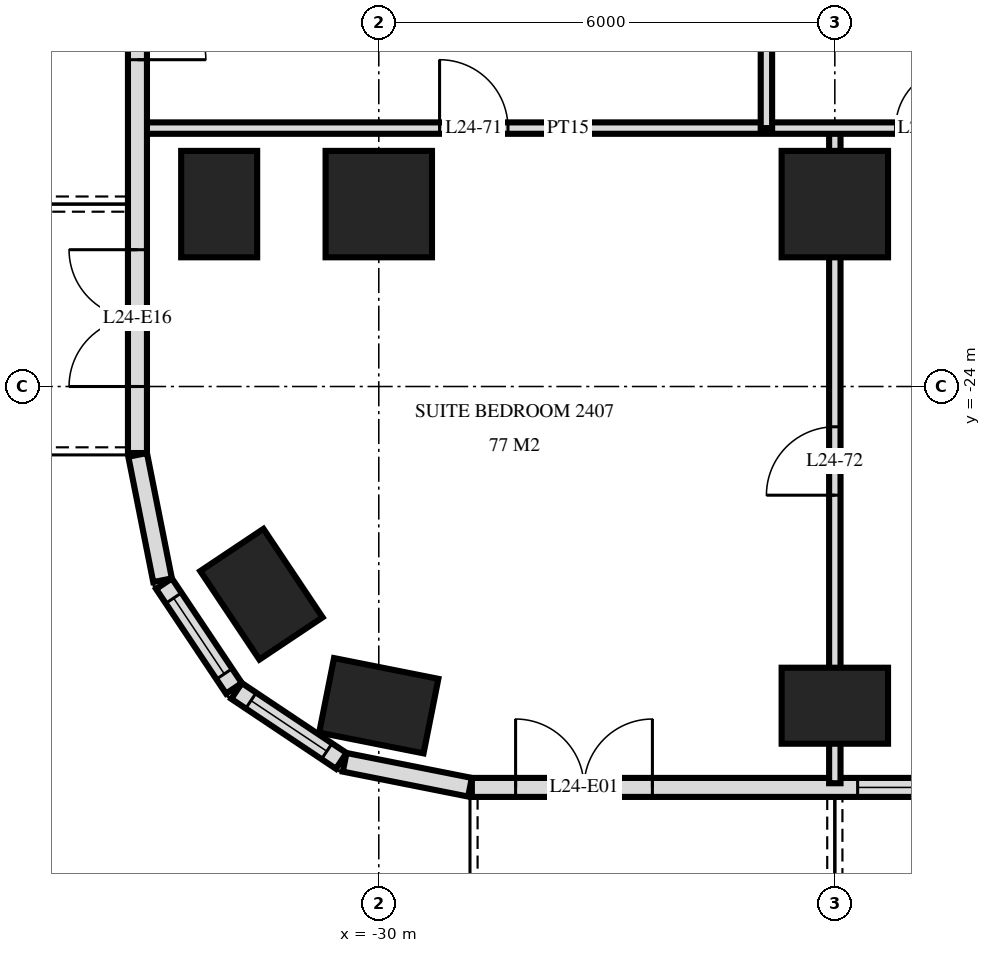
"""IFC4 building model, lengths in metres.
Left out: names, types, materials, properties, quantities, classifications, styles, units other than length and angle.
Written with IfcOpenShell. Run it as: python <this file> out.ifc"""

import sys

from ifc_helpers import new_model, si_unit, direction, frame, frame_2d, origin, origin_2d, place, context, subcontext, project, spatial, rectangle, extrude, element, fill, save


model = new_model("IFC4")
c1 = context("Model", 3, precision=1e-05, world=origin(), true_north=direction((0.0, 1.0)))
c2 = subcontext(c1, "Body", "Model", "MODEL_VIEW")
j1 = project(units=[si_unit("LENGTHUNIT", "METRE"), si_unit("PLANEANGLEUNIT", "RADIAN")], contexts=[c1])
p1 = place(None, origin())
s1 = spatial("IfcSite", under=j1, at=p1, CompositionType="ELEMENT")
p2 = place(p1, origin())
s2 = spatial("IfcBuilding", under=s1, at=p2, CompositionType="ELEMENT")
p3 = place(p2, frame((0.0, 0.0, 96.0)))
s3 = spatial("IfcBuildingStorey", under=s2, at=p3, CompositionType="ELEMENT", Elevation=96.0)
for number, where, z_axis, x_axis in (
    (1, (-32.1, -21.6, 0.0), (0.0, 0.0, 1.0), (0.0, 1.0, 0.0)),
    (2, (-31.544, -26.733, 0.0), (0.0, 0.0, 1.0), (-0.556, 0.831, 0.0)),
    (3, (-30.0, -28.2, 0.0), (0.0, 0.0, 1.0), (-0.981, 0.195, 0.0)),
):
    element("IfcColumn", number, at=place(p3, frame(where, z_axis=z_axis, x_axis=x_axis)), inside=s3, PredefinedType="COLUMN", context=c2, shape_type="SweptSolid", body=[
        extrude(rectangle(XDim=1.4, YDim=1.0, at=origin_2d()), origin(), (0.0, 0.0, 1.0), 3.6),
    ])
p4 = place(p3, frame((-30.0, -21.6, 0.0), z_axis=(0.0, 0.0, 1.0), x_axis=(1.0, 0.0, 0.0)))
e4 = element("IfcColumn", 4, at=p4, inside=s3, PredefinedType="COLUMN", context=c2, shape_type="SweptSolid", body=[
    extrude(rectangle(XDim=1.4, YDim=1.4, at=origin_2d()), origin(), (0.0, 0.0, 1.0), 3.6),
])
p5 = place(p3, frame((-24.0, -28.2, 0.0), z_axis=(0.0, 0.0, 1.0), x_axis=(1.0, 0.0, 0.0)))
e5 = element("IfcColumn", 5, at=p5, inside=s3, PredefinedType="COLUMN", context=c2, shape_type="SweptSolid", body=[
    extrude(rectangle(XDim=1.4, YDim=1.0, at=origin_2d()), origin(), (0.0, 0.0, 1.0), 3.6),
])
p6 = place(p3, frame((-24.0, -21.6, 0.0), z_axis=(0.0, 0.0, 1.0), x_axis=(1.0, 0.0, 0.0)))
e6 = element("IfcColumn", 6, at=p6, inside=s3, PredefinedType="COLUMN", context=c2, shape_type="SweptSolid", body=[
    extrude(rectangle(XDim=1.4, YDim=1.4, at=origin_2d()), origin(), (0.0, 0.0, 1.0), 3.6),
])
p7 = place(p3, frame((-33.175, -3.325, 0.0), z_axis=(0.0, 0.0, 1.0), x_axis=(0.0, -1.0, 0.0)))
e7 = element("IfcWall", 7, at=p7, inside=s3, PredefinedType="SOLIDWALL", context=c2, shape_type="SweptSolid", body=[
    extrude(rectangle(XDim=21.551, YDim=0.25, at=frame_2d((10.775, 0.0))), origin(), (0.0, 0.0, 1.0), 3.32),
])
p8 = place(p7, frame((7.025, 0.0, 0.0)))
e8 = element("IfcOpeningElement", 8, at=p8, cuts=e7, PredefinedType="OPENING", context=c2, shape_type="SweptSolid", body=[
    extrude(rectangle(XDim=1.8, YDim=2.4, at=frame_2d((0.9, 1.2))), frame((0.0, 0.135, 0.0), z_axis=(0.0, -1.0, 0.0), x_axis=(1.0, 0.0, 0.0)), (0.0, 0.0, 1.0), 0.27),
])
p9 = place(p7, frame((12.075, 0.0, 0.3)))
e9 = element("IfcOpeningElement", 9, at=p9, cuts=e7, PredefinedType="OPENING", context=c2, shape_type="SweptSolid", body=[
    extrude(rectangle(XDim=1.2, YDim=2.1, at=frame_2d((0.6, 1.05))), frame((0.0, 0.135, 0.0), z_axis=(0.0, -1.0, 0.0), x_axis=(1.0, 0.0, 0.0)), (0.0, 0.0, 1.0), 0.27),
])
p10 = place(p7, frame((14.575, 0.0, 0.0)))
e10 = element("IfcOpeningElement", 10, at=p10, cuts=e7, PredefinedType="OPENING", context=c2, shape_type="SweptSolid", body=[
    extrude(rectangle(XDim=1.8, YDim=2.4, at=frame_2d((0.9, 1.2))), frame((0.0, 0.135, 0.0), z_axis=(0.0, -1.0, 0.0), x_axis=(1.0, 0.0, 0.0)), (0.0, 0.0, 1.0), 0.27),
])
p11 = place(p7, frame((18.875, 0.0, 0.0)))
e11 = element("IfcOpeningElement", 11, at=p11, cuts=e7, PredefinedType="OPENING", context=c2, shape_type="SweptSolid", body=[
    extrude(rectangle(XDim=1.8, YDim=2.4, at=frame_2d((0.9, 1.2))), frame((0.0, 0.135, 0.0), z_axis=(0.0, -1.0, 0.0), x_axis=(1.0, 0.0, 0.0)), (0.0, 0.0, 1.0), 0.27),
])
p12 = place(p3, frame((-33.173, -24.9, 0.0), z_axis=(0.0, 0.0, 1.0), x_axis=(0.195166572128, -0.980770110232, 0.0)))
e12 = element("IfcWall", 12, at=p12, inside=s3, PredefinedType="SOLIDWALL", context=c2, shape_type="SweptSolid", body=[
    extrude(rectangle(XDim=1.681, YDim=0.25, at=frame_2d((0.841, 0.0))), origin(), (0.0, 0.0, 1.0), 3.32),
])
p13 = place(p3, frame((-32.826, -26.594, 0.0), z_axis=(0.0, 0.0, 1.0), x_axis=(0.55555029066, -0.831482937015, 0.0)))
e13 = element("IfcWall", 13, at=p13, inside=s3, PredefinedType="SOLIDWALL", context=c2, shape_type="SweptSolid", body=[
    extrude(rectangle(XDim=1.656, YDim=0.25, at=frame_2d((0.828, 0.0))), origin(), (0.0, 0.0, 1.0), 3.32),
])
p14 = place(p13, frame((0.228, 0.0, 0.9)))
e14 = element("IfcOpeningElement", 14, at=p14, cuts=e13, PredefinedType="OPENING", context=c2, shape_type="SweptSolid", body=[
    extrude(rectangle(XDim=1.2, YDim=1.5, at=frame_2d((0.6, 0.75))), frame((0.0, 0.135, 0.0), z_axis=(0.0, -1.0, 0.0), x_axis=(1.0, 0.0, 0.0)), (0.0, 0.0, 1.0), 0.27),
])
p15 = place(p3, frame((-31.871, -28.006, 0.0), z_axis=(0.0, 0.0, 1.0), x_axis=(0.831482937015, -0.55555029066, 0.0)))
e15 = element("IfcWall", 15, at=p15, inside=s3, PredefinedType="SOLIDWALL", context=c2, shape_type="SweptSolid", body=[
    extrude(rectangle(XDim=1.656, YDim=0.25, at=frame_2d((0.828, 0.0))), origin(), (0.0, 0.0, 1.0), 3.32),
])
p16 = place(p15, frame((0.228, 0.0, 0.9)))
e16 = element("IfcOpeningElement", 16, at=p16, cuts=e15, PredefinedType="OPENING", context=c2, shape_type="SweptSolid", body=[
    extrude(rectangle(XDim=1.2, YDim=1.5, at=frame_2d((0.6, 0.75))), frame((0.0, 0.135, 0.0), z_axis=(0.0, -1.0, 0.0), x_axis=(1.0, 0.0, 0.0)), (0.0, 0.0, 1.0), 0.27),
])
p17 = place(p3, frame((-30.449, -28.945, 0.0), z_axis=(0.0, 0.0, 1.0), x_axis=(0.980775640221, -0.19513878023, 0.0)))
e17 = element("IfcWall", 17, at=p17, inside=s3, PredefinedType="SOLIDWALL", context=c2, shape_type="SweptSolid", body=[
    extrude(rectangle(XDim=1.681, YDim=0.25, at=frame_2d((0.841, 0.0))), origin(), (0.0, 0.0, 1.0), 3.32),
])
p18 = place(p3, frame((-28.775, -29.275, 0.0), z_axis=(0.0, 0.0, 1.0), x_axis=(1.0, 0.0, 0.0)))
e18 = element("IfcWall", 18, at=p18, inside=s3, PredefinedType="SOLIDWALL", context=c2, shape_type="SweptSolid", body=[
    extrude(rectangle(XDim=57.551, YDim=0.25, at=frame_2d((28.775, 0.0))), origin(), (0.0, 0.0, 1.0), 3.32),
])
p19 = place(p18, frame((0.575, 0.0, 0.0)))
e19 = element("IfcOpeningElement", 19, at=p19, cuts=e18, PredefinedType="OPENING", context=c2, shape_type="SweptSolid", body=[
    extrude(rectangle(XDim=1.8, YDim=2.4, at=frame_2d((0.9, 1.2))), frame((0.0, 0.135, 0.0), z_axis=(0.0, -1.0, 0.0), x_axis=(1.0, 0.0, 0.0)), (0.0, 0.0, 1.0), 0.27),
])
p20 = place(p18, frame((5.075, 0.0, 0.3)))
e20 = element("IfcOpeningElement", 20, at=p20, cuts=e18, PredefinedType="OPENING", context=c2, shape_type="SweptSolid", body=[
    extrude(rectangle(XDim=2.4, YDim=2.1, at=frame_2d((1.2, 1.05))), frame((0.0, 0.135, 0.0), z_axis=(0.0, -1.0, 0.0), x_axis=(1.0, 0.0, 0.0)), (0.0, 0.0, 1.0), 0.27),
])
p21 = place(p18, frame((8.375, 0.0, 0.0)))
e21 = element("IfcOpeningElement", 21, at=p21, cuts=e18, PredefinedType="OPENING", context=c2, shape_type="SweptSolid", body=[
    extrude(rectangle(XDim=1.8, YDim=2.4, at=frame_2d((0.9, 1.2))), frame((0.0, 0.135, 0.0), z_axis=(0.0, -1.0, 0.0), x_axis=(1.0, 0.0, 0.0)), (0.0, 0.0, 1.0), 0.27),
])
p22 = place(p18, frame((11.375, 0.0, 0.0)))
e22 = element("IfcOpeningElement", 22, at=p22, cuts=e18, PredefinedType="OPENING", context=c2, shape_type="SweptSolid", body=[
    extrude(rectangle(XDim=1.8, YDim=2.4, at=frame_2d((0.9, 1.2))), frame((0.0, 0.135, 0.0), z_axis=(0.0, -1.0, 0.0), x_axis=(1.0, 0.0, 0.0)), (0.0, 0.0, 1.0), 0.27),
])
p23 = place(p18, frame((14.075, 0.0, 0.3)))
e23 = element("IfcOpeningElement", 23, at=p23, cuts=e18, PredefinedType="OPENING", context=c2, shape_type="SweptSolid", body=[
    extrude(rectangle(XDim=2.4, YDim=2.1, at=frame_2d((1.2, 1.05))), frame((0.0, 0.135, 0.0), z_axis=(0.0, -1.0, 0.0), x_axis=(1.0, 0.0, 0.0)), (0.0, 0.0, 1.0), 0.27),
])
p24 = place(p18, frame((17.375, 0.0, 0.0)))
e24 = element("IfcOpeningElement", 24, at=p24, cuts=e18, PredefinedType="OPENING", context=c2, shape_type="SweptSolid", body=[
    extrude(rectangle(XDim=1.8, YDim=2.4, at=frame_2d((0.9, 1.2))), frame((0.0, 0.135, 0.0), z_axis=(0.0, -1.0, 0.0), x_axis=(1.0, 0.0, 0.0)), (0.0, 0.0, 1.0), 0.27),
])
p25 = place(p18, frame((20.075, 0.0, 0.3)))
e25 = element("IfcOpeningElement", 25, at=p25, cuts=e18, PredefinedType="OPENING", context=c2, shape_type="SweptSolid", body=[
    extrude(rectangle(XDim=2.4, YDim=2.1, at=frame_2d((1.2, 1.05))), frame((0.0, 0.135, 0.0), z_axis=(0.0, -1.0, 0.0), x_axis=(1.0, 0.0, 0.0)), (0.0, 0.0, 1.0), 0.27),
])
p26 = place(p18, frame((23.075, 0.0, 0.3)))
e26 = element("IfcOpeningElement", 26, at=p26, cuts=e18, PredefinedType="OPENING", context=c2, shape_type="SweptSolid", body=[
    extrude(rectangle(XDim=2.4, YDim=2.1, at=frame_2d((1.2, 1.05))), frame((0.0, 0.135, 0.0), z_axis=(0.0, -1.0, 0.0), x_axis=(1.0, 0.0, 0.0)), (0.0, 0.0, 1.0), 0.27),
])
p27 = place(p18, frame((26.375, 0.0, 0.0)))
e27 = element("IfcOpeningElement", 27, at=p27, cuts=e18, PredefinedType="OPENING", context=c2, shape_type="SweptSolid", body=[
    extrude(rectangle(XDim=1.8, YDim=2.4, at=frame_2d((0.9, 1.2))), frame((0.0, 0.135, 0.0), z_axis=(0.0, -1.0, 0.0), x_axis=(1.0, 0.0, 0.0)), (0.0, 0.0, 1.0), 0.27),
])
p28 = place(p18, frame((29.375, 0.0, 0.0)))
e28 = element("IfcOpeningElement", 28, at=p28, cuts=e18, PredefinedType="OPENING", context=c2, shape_type="SweptSolid", body=[
    extrude(rectangle(XDim=1.8, YDim=2.4, at=frame_2d((0.9, 1.2))), frame((0.0, 0.135, 0.0), z_axis=(0.0, -1.0, 0.0), x_axis=(1.0, 0.0, 0.0)), (0.0, 0.0, 1.0), 0.27),
])
p29 = place(p18, frame((32.075, 0.0, 0.3)))
e29 = element("IfcOpeningElement", 29, at=p29, cuts=e18, PredefinedType="OPENING", context=c2, shape_type="SweptSolid", body=[
    extrude(rectangle(XDim=2.4, YDim=2.1, at=frame_2d((1.2, 1.05))), frame((0.0, 0.135, 0.0), z_axis=(0.0, -1.0, 0.0), x_axis=(1.0, 0.0, 0.0)), (0.0, 0.0, 1.0), 0.27),
])
p30 = place(p18, frame((35.375, 0.0, 0.0)))
e30 = element("IfcOpeningElement", 30, at=p30, cuts=e18, PredefinedType="OPENING", context=c2, shape_type="SweptSolid", body=[
    extrude(rectangle(XDim=1.8, YDim=2.4, at=frame_2d((0.9, 1.2))), frame((0.0, 0.135, 0.0), z_axis=(0.0, -1.0, 0.0), x_axis=(1.0, 0.0, 0.0)), (0.0, 0.0, 1.0), 0.27),
])
p31 = place(p18, frame((38.075, 0.0, 0.3)))
e31 = element("IfcOpeningElement", 31, at=p31, cuts=e18, PredefinedType="OPENING", context=c2, shape_type="SweptSolid", body=[
    extrude(rectangle(XDim=2.4, YDim=2.1, at=frame_2d((1.2, 1.05))), frame((0.0, 0.135, 0.0), z_axis=(0.0, -1.0, 0.0), x_axis=(1.0, 0.0, 0.0)), (0.0, 0.0, 1.0), 0.27),
])
p32 = place(p18, frame((41.075, 0.0, 0.3)))
e32 = element("IfcOpeningElement", 32, at=p32, cuts=e18, PredefinedType="OPENING", context=c2, shape_type="SweptSolid", body=[
    extrude(rectangle(XDim=2.4, YDim=2.1, at=frame_2d((1.2, 1.05))), frame((0.0, 0.135, 0.0), z_axis=(0.0, -1.0, 0.0), x_axis=(1.0, 0.0, 0.0)), (0.0, 0.0, 1.0), 0.27),
])
p33 = place(p18, frame((44.375, 0.0, 0.0)))
e33 = element("IfcOpeningElement", 33, at=p33, cuts=e18, PredefinedType="OPENING", context=c2, shape_type="SweptSolid", body=[
    extrude(rectangle(XDim=1.8, YDim=2.4, at=frame_2d((0.9, 1.2))), frame((0.0, 0.135, 0.0), z_axis=(0.0, -1.0, 0.0), x_axis=(1.0, 0.0, 0.0)), (0.0, 0.0, 1.0), 0.27),
])
p34 = place(p18, frame((47.075, 0.0, 0.3)))
e34 = element("IfcOpeningElement", 34, at=p34, cuts=e18, PredefinedType="OPENING", context=c2, shape_type="SweptSolid", body=[
    extrude(rectangle(XDim=2.4, YDim=2.1, at=frame_2d((1.2, 1.05))), frame((0.0, 0.135, 0.0), z_axis=(0.0, -1.0, 0.0), x_axis=(1.0, 0.0, 0.0)), (0.0, 0.0, 1.0), 0.27),
])
p35 = place(p18, frame((50.375, 0.0, 0.0)))
e35 = element("IfcOpeningElement", 35, at=p35, cuts=e18, PredefinedType="OPENING", context=c2, shape_type="SweptSolid", body=[
    extrude(rectangle(XDim=1.8, YDim=2.4, at=frame_2d((0.9, 1.2))), frame((0.0, 0.135, 0.0), z_axis=(0.0, -1.0, 0.0), x_axis=(1.0, 0.0, 0.0)), (0.0, 0.0, 1.0), 0.27),
])
p36 = place(p18, frame((53.375, 0.0, 0.0)))
e36 = element("IfcOpeningElement", 36, at=p36, cuts=e18, PredefinedType="OPENING", context=c2, shape_type="SweptSolid", body=[
    extrude(rectangle(XDim=1.8, YDim=2.4, at=frame_2d((0.9, 1.2))), frame((0.0, 0.135, 0.0), z_axis=(0.0, -1.0, 0.0), x_axis=(1.0, 0.0, 0.0)), (0.0, 0.0, 1.0), 0.27),
])
p37 = place(p3, frame((-24.0, -29.22, 0.0), z_axis=(0.0, 0.0, 1.0), x_axis=(0.0, 1.0, 0.0)))
e37 = element("IfcWall", 37, at=p37, inside=s3, PredefinedType="PARTITIONING", context=c2, shape_type="SweptSolid", body=[
    extrude(rectangle(XDim=8.62, YDim=0.15, at=frame_2d((4.31, 0.0))), origin(), (0.0, 0.0, 1.0), 3.32),
])
p38 = place(p37, frame((3.79, 0.0, 0.0)))
e38 = element("IfcOpeningElement", 38, at=p38, cuts=e37, PredefinedType="OPENING", context=c2, shape_type="SweptSolid", body=[
    extrude(rectangle(XDim=0.9, YDim=2.1, at=frame_2d((0.45, 1.05))), frame((0.0, 0.085, 0.0), z_axis=(0.0, -1.0, 0.0), x_axis=(1.0, 0.0, 0.0)), (0.0, 0.0, 1.0), 0.17),
])
p39 = place(p3, frame((-24.9, -20.6, 0.0), z_axis=(0.0, 0.0, 1.0), x_axis=(0.0, 1.0, 0.0)))
e39 = element("IfcWall", 39, at=p39, inside=s3, PredefinedType="PARTITIONING", context=c2, shape_type="SweptSolid", body=[
    extrude(rectangle(XDim=3.6, YDim=0.15, at=frame_2d((1.8, 0.0))), origin(), (0.0, 0.0, 1.0), 3.32),
])
p40 = place(p3, frame((-33.12, -20.6, 0.0), z_axis=(0.0, 0.0, 1.0), x_axis=(1.0, 0.0, 0.0)))
e40 = element("IfcWall", 40, at=p40, inside=s3, PredefinedType="PARTITIONING", context=c2, shape_type="SweptSolid", body=[
    extrude(rectangle(XDim=11.22, YDim=0.15, at=frame_2d((5.61, 0.0))), origin(), (0.0, 0.0, 1.0), 3.32),
])
p41 = place(p40, frame((9.92, 0.0, 0.0)))
e41 = element("IfcOpeningElement", 41, at=p41, cuts=e40, PredefinedType="OPENING", context=c2, shape_type="SweptSolid", body=[
    extrude(rectangle(XDim=0.8, YDim=2.1, at=frame_2d((0.4, 1.05))), frame((0.0, 0.085, 0.0), z_axis=(0.0, -1.0, 0.0), x_axis=(1.0, 0.0, 0.0)), (0.0, 0.0, 1.0), 0.17),
])
p42 = place(p40, frame((3.92, 0.0, 0.0)))
e42 = element("IfcOpeningElement", 42, at=p42, cuts=e40, PredefinedType="OPENING", context=c2, shape_type="SweptSolid", body=[
    extrude(rectangle(XDim=0.9, YDim=2.1, at=frame_2d((0.45, 1.05))), frame((0.0, 0.085, 0.0), z_axis=(0.0, -1.0, 0.0), x_axis=(1.0, 0.0, 0.0)), (0.0, 0.0, 1.0), 0.17),
])
p43 = place(p14, origin())
e43 = element("IfcWindow", 43, at=p43, inside=s3, PartitioningType="SINGLE_PANEL", PredefinedType="WINDOW", context=c2, shape_type="SweptSolid", body=[
    extrude(rectangle(XDim=1.2, YDim=1.5, at=frame_2d((0.6, 0.75))), frame((0.0, 0.03, 0.0), z_axis=(0.0, -1.0, 0.0), x_axis=(1.0, 0.0, 0.0)), (0.0, 0.0, 1.0), 0.06),
])
fill(e14, e43)
p44 = place(p16, origin())
e44 = element("IfcWindow", 44, at=p44, inside=s3, PartitioningType="SINGLE_PANEL", PredefinedType="WINDOW", context=c2, shape_type="SweptSolid", body=[
    extrude(rectangle(XDim=1.2, YDim=1.5, at=frame_2d((0.6, 0.75))), frame((0.0, 0.03, 0.0), z_axis=(0.0, -1.0, 0.0), x_axis=(1.0, 0.0, 0.0)), (0.0, 0.0, 1.0), 0.06),
])
fill(e16, e44)
p45 = place(p19, origin())
e45 = element("IfcDoor", 45, at=p45, inside=s3, OperationType="DOUBLE_DOOR_SINGLE_SWING", PredefinedType="DOOR", context=c2, shape_type="SweptSolid", body=[
    extrude(rectangle(XDim=1.8, YDim=2.4, at=frame_2d((0.9, 1.2))), frame((0.0, 0.025, 0.0), z_axis=(0.0, -1.0, 0.0), x_axis=(1.0, 0.0, 0.0)), (0.0, 0.0, 1.0), 0.05),
])
fill(e19, e45)
p46 = place(p20, origin())
e46 = element("IfcWindow", 46, at=p46, inside=s3, PartitioningType="SINGLE_PANEL", PredefinedType="WINDOW", context=c2, shape_type="SweptSolid", body=[
    extrude(rectangle(XDim=2.4, YDim=2.1, at=frame_2d((1.2, 1.05))), frame((0.0, 0.03, 0.0), z_axis=(0.0, -1.0, 0.0), x_axis=(1.0, 0.0, 0.0)), (0.0, 0.0, 1.0), 0.06),
])
fill(e20, e46)
p47 = place(p10, origin())
e47 = element("IfcDoor", 47, at=p47, inside=s3, OperationType="DOUBLE_DOOR_SINGLE_SWING", PredefinedType="DOOR", context=c2, shape_type="SweptSolid", body=[
    extrude(rectangle(XDim=1.8, YDim=2.4, at=frame_2d((0.9, 1.2))), frame((0.0, 0.025, 0.0), z_axis=(0.0, -1.0, 0.0), x_axis=(1.0, 0.0, 0.0)), (0.0, 0.0, 1.0), 0.05),
])
fill(e10, e47)
p48 = place(p11, frame((0.9, 0.0, 0.0), z_axis=(0.0, 0.0, 1.0), x_axis=(-1.0, 0.0, 0.0)))
e48 = element("IfcDoor", 48, at=p48, inside=s3, OperationType="DOUBLE_DOOR_SINGLE_SWING", PredefinedType="DOOR", context=c2, shape_type="SweptSolid", body=[
    extrude(rectangle(XDim=1.8, YDim=2.4, at=frame_2d((0.0, 1.2))), frame((0.0, -0.025, 0.0), z_axis=(0.0, 1.0, 0.0), x_axis=(-1.0, 0.0, 0.0)), (0.0, 0.0, 1.0), 0.05),
])
fill(e11, e48)
p49 = place(p41, origin())
e49 = element("IfcDoor", 49, at=p49, inside=s3, OperationType="SINGLE_SWING_LEFT", PredefinedType="DOOR", context=c2, shape_type="SweptSolid", body=[
    extrude(rectangle(XDim=0.8, YDim=2.1, at=frame_2d((0.4, 1.05))), frame((0.0, 0.025, 0.0), z_axis=(0.0, -1.0, 0.0), x_axis=(1.0, 0.0, 0.0)), (0.0, 0.0, 1.0), 0.05),
])
fill(e41, e49)
p50 = place(p42, origin())
e50 = element("IfcDoor", 50, at=p50, inside=s3, OperationType="SINGLE_SWING_RIGHT", PredefinedType="DOOR", context=c2, shape_type="SweptSolid", body=[
    extrude(rectangle(XDim=0.9, YDim=2.1, at=frame_2d((0.45, 1.05))), frame((0.0, 0.025, 0.0), z_axis=(0.0, -1.0, 0.0), x_axis=(1.0, 0.0, 0.0)), (0.0, 0.0, 1.0), 0.05),
])
fill(e42, e50)
p51 = place(p38, origin())
e51 = element("IfcDoor", 51, at=p51, inside=s3, OperationType="SINGLE_SWING_RIGHT", PredefinedType="DOOR", context=c2, shape_type="SweptSolid", body=[
    extrude(rectangle(XDim=0.9, YDim=2.1, at=frame_2d((0.45, 1.05))), frame((0.0, 0.025, 0.0), z_axis=(0.0, -1.0, 0.0), x_axis=(1.0, 0.0, 0.0)), (0.0, 0.0, 1.0), 0.05),
])
fill(e38, e51)
save(model, sys.argv[1])
